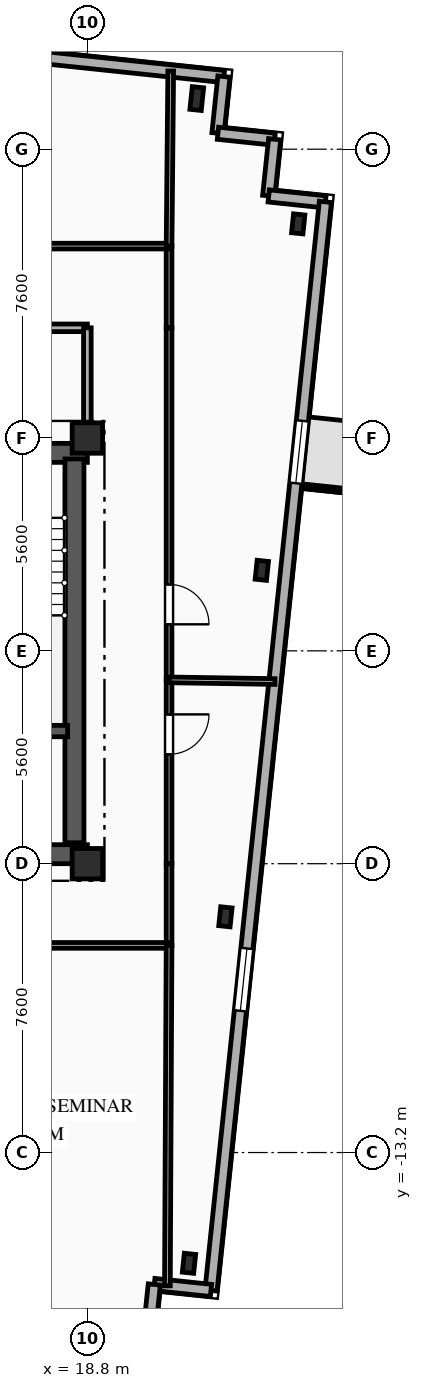
"""IFC4 building model, lengths in metres.
Left out: names, types, materials, properties, quantities, classifications, styles, units other than length and angle.
Written with IfcOpenShell. Run it as: python <this file> out.ifc"""

import sys

from ifc_helpers import new_model, si_unit, direction, frame, frame_2d, origin, origin_2d, place, context, subcontext, project, spatial, rectangle, i_section, extrude, element, fill, save


model = new_model("IFC4")
c1 = context("Model", 3, precision=1e-05, world=origin(), true_north=direction((0.0, 1.0)))
c2 = subcontext(c1, "Body", "Model", "MODEL_VIEW")
j1 = project(units=[si_unit("LENGTHUNIT", "METRE"), si_unit("PLANEANGLEUNIT", "RADIAN")], contexts=[c1])
p1 = place(None, origin())
s1 = spatial("IfcSite", under=j1, at=p1, CompositionType="ELEMENT")
p2 = place(p1, origin())
s2 = spatial("IfcBuilding", under=s1, at=p2, CompositionType="ELEMENT")
p3 = place(p2, frame((0.0, 0.0, 203.1)))
s3 = spatial("IfcBuildingStorey", under=s2, at=p3, CompositionType="ELEMENT", Elevation=203.1)
for number, where, z_axis, x_axis in (
    (1, (18.8, -5.6, 0.0), (0.0, 0.0, 1.0), (1.0, 0.0, 0.0)),
    (2, (18.8, 5.6, 0.0), (0.0, 0.0, 1.0), (1.0, 0.0, 0.0)),
):
    element("IfcColumn", number, at=place(p3, frame(where, z_axis=z_axis, x_axis=x_axis)), inside=s3, PredefinedType="COLUMN", context=c2, shape_type="SweptSolid", body=[
        extrude(rectangle(XDim=0.8, YDim=0.8, at=origin_2d()), origin(), (0.0, 0.0, 1.0), 3.35),
    ])
p4 = place(p3, frame((21.679, 14.532, 0.0), z_axis=(0.0, 0.0, 1.0), x_axis=(0.994521895368, -0.104528463268, 0.0)))
e3 = element("IfcColumn", 3, at=p4, inside=s3, PredefinedType="COLUMN", context=c2, shape_type="SweptSolid", body=[
    extrude(i_section(OverallWidth=0.3, OverallDepth=0.6, WebThickness=0.015, FlangeThickness=0.03, FilletRadius=0.027, at=origin_2d()), origin(), (0.0, 0.0, 1.0), 3.35),
])
for number, where, z_axis, x_axis in (
    (4, (21.474, -16.114, 0.0), (0.0, 0.0, 1.0), (0.995, -0.105, 0.0)),
    (5, (22.433, -6.998, 0.0), (0.0, 0.0, 1.0), (0.995, -0.105, 0.0)),
    (6, (23.391, 2.119, 0.0), (0.0, 0.0, 1.0), (0.995, -0.105, 0.0)),
    (7, (24.349, 11.235, 0.0), (0.0, 0.0, 1.0), (0.995, -0.105, 0.0)),
):
    element("IfcColumn", number, at=place(p3, frame(where, z_axis=z_axis, x_axis=x_axis)), inside=s3, PredefinedType="COLUMN", context=c2, shape_type="SweptSolid", body=[
        extrude(i_section(OverallWidth=0.3, OverallDepth=0.5, WebThickness=0.014, FlangeThickness=0.028, FilletRadius=0.027, at=origin_2d()), origin(), (0.0, 0.0, 1.0), 3.35),
    ])
p5 = place(p3, frame((-23.156, 19.898, 0.0), z_axis=(0.0, 0.0, 1.0), x_axis=(0.994522001802, -0.104527450613, 0.0)))
e8 = element("IfcWall", 8, at=p5, inside=s3, PredefinedType="SOLIDWALL", context=c2, shape_type="SweptSolid", body=[
    extrude(rectangle(XDim=45.8, YDim=0.32, at=frame_2d((22.9, 0.0))), origin(), (0.0, 0.0, 1.0), 3.04),
])
p6 = place(p5, frame((4.139, 0.0, 0.85)))
e9 = element("IfcOpeningElement", 9, at=p6, cuts=e8, PredefinedType="OPENING", context=c2, shape_type="SweptSolid", body=[
    extrude(rectangle(XDim=1.65, YDim=1.85, at=frame_2d((0.825, 0.925))), frame((0.0, 0.17, 0.0), z_axis=(0.0, -1.0, 0.0), x_axis=(1.0, 0.0, 0.0)), (0.0, 0.0, 1.0), 0.34),
])
p7 = place(p5, frame((9.384, 0.0, 0.85)))
e10 = element("IfcOpeningElement", 10, at=p7, cuts=e8, PredefinedType="OPENING", context=c2, shape_type="SweptSolid", body=[
    extrude(rectangle(XDim=1.65, YDim=1.85, at=frame_2d((0.825, 0.925))), frame((0.0, 0.17, 0.0), z_axis=(0.0, -1.0, 0.0), x_axis=(1.0, 0.0, 0.0)), (0.0, 0.0, 1.0), 0.34),
])
p8 = place(p5, frame((18.497, 0.0, 0.85)))
e11 = element("IfcOpeningElement", 11, at=p8, cuts=e8, PredefinedType="OPENING", context=c2, shape_type="SweptSolid", body=[
    extrude(rectangle(XDim=1.6, YDim=1.85, at=frame_2d((0.8, 0.925))), frame((0.0, 0.17, 0.0), z_axis=(0.0, -1.0, 0.0), x_axis=(1.0, 0.0, 0.0)), (0.0, 0.0, 1.0), 0.34),
])
p9 = place(p5, frame((27.525, 0.0, 0.85)))
e12 = element("IfcOpeningElement", 12, at=p9, cuts=e8, PredefinedType="OPENING", context=c2, shape_type="SweptSolid", body=[
    extrude(rectangle(XDim=2.2, YDim=1.85, at=frame_2d((1.1, 0.925))), frame((0.0, 0.17, 0.0), z_axis=(0.0, -1.0, 0.0), x_axis=(1.0, 0.0, 0.0)), (0.0, 0.0, 1.0), 0.34),
])
p10 = place(p5, frame((38.329, 0.0, 0.85)))
e13 = element("IfcOpeningElement", 13, at=p10, cuts=e8, PredefinedType="OPENING", context=c2, shape_type="SweptSolid", body=[
    extrude(rectangle(XDim=1.65, YDim=1.85, at=frame_2d((0.825, 0.925))), frame((0.0, 0.17, 0.0), z_axis=(0.0, -1.0, 0.0), x_axis=(1.0, 0.0, 0.0)), (0.0, 0.0, 1.0), 0.34),
])
p11 = place(p3, frame((22.393, 15.111, 0.0), z_axis=(0.0, 0.0, 1.0), x_axis=(-0.104481464157, -0.994526834051, 0.0)))
e14 = element("IfcWall", 14, at=p11, inside=s3, PredefinedType="SOLIDWALL", context=c2, shape_type="SweptSolid", body=[
    extrude(rectangle(XDim=1.5, YDim=0.32, at=frame_2d((0.75, 0.0))), origin(), (0.0, 0.0, 1.0), 3.04),
])
for number, where, z_axis, x_axis in (
    (15, (22.237, 13.619, 0.0), (0.0, 0.0, 1.0), (0.995, -0.104, 0.0)),
    (16, (23.728, 13.462, 0.0), (0.0, 0.0, 1.0), (-0.104, -0.995, 0.0)),
    (17, (23.572, 11.971, 0.0), (0.0, 0.0, 1.0), (0.995, -0.105, 0.0)),
):
    element("IfcWall", number, at=place(p3, frame(where, z_axis=z_axis, x_axis=x_axis)), inside=s3, PredefinedType="SOLIDWALL", context=c2, shape_type="SweptSolid", body=[
        extrude(rectangle(XDim=1.5, YDim=0.32, at=frame_2d((0.75, 0.0))), origin(), (0.0, 0.0, 1.0), 3.04),
    ])
p12 = place(p3, frame((25.063, 11.814, 0.0), z_axis=(0.0, 0.0, 1.0), x_axis=(-0.104523275986, -0.99452244056, 0.0)))
e18 = element("IfcWall", 18, at=p12, inside=s3, PredefinedType="SOLIDWALL", context=c2, shape_type="SweptSolid", body=[
    extrude(rectangle(XDim=28.8, YDim=0.32, at=frame_2d((14.4, 0.0))), origin(), (0.0, 0.0, 1.0), 3.04),
])
p13 = place(p12, frame((5.793, 0.0, 0.85)))
e19 = element("IfcOpeningElement", 19, at=p13, cuts=e18, PredefinedType="OPENING", context=c2, shape_type="SweptSolid", body=[
    extrude(rectangle(XDim=1.65, YDim=1.85, at=frame_2d((0.825, 0.925))), frame((0.0, 0.17, 0.0), z_axis=(0.0, -1.0, 0.0), x_axis=(1.0, 0.0, 0.0)), (0.0, 0.0, 1.0), 0.34),
])
p14 = place(p12, frame((19.752, 0.0, 0.85)))
e20 = element("IfcOpeningElement", 20, at=p14, cuts=e18, PredefinedType="OPENING", context=c2, shape_type="SweptSolid", body=[
    extrude(rectangle(XDim=1.65, YDim=1.85, at=frame_2d((0.825, 0.925))), frame((0.0, 0.17, 0.0), z_axis=(0.0, -1.0, 0.0), x_axis=(1.0, 0.0, 0.0)), (0.0, 0.0, 1.0), 0.34),
])
p15 = place(p3, frame((22.053, -16.828, 0.0), z_axis=(0.0, 0.0, 1.0), x_axis=(-0.994526834051, 0.104481464157, 0.0)))
e21 = element("IfcWall", 21, at=p15, inside=s3, PredefinedType="SOLIDWALL", context=c2, shape_type="SweptSolid", body=[
    extrude(rectangle(XDim=1.5, YDim=0.32, at=frame_2d((0.75, 0.0))), origin(), (0.0, 0.0, 1.0), 3.04),
])
p16 = place(p3, frame((20.561, -16.672, 0.0), z_axis=(0.0, 0.0, 1.0), x_axis=(-0.104498377516, -0.994525057048, 0.0)))
e22 = element("IfcWall", 22, at=p16, inside=s3, PredefinedType="SOLIDWALL", context=c2, shape_type="SweptSolid", body=[
    extrude(rectangle(XDim=1.5, YDim=0.32, at=frame_2d((0.75, 0.0))), origin(), (0.0, 0.0, 1.0), 3.04),
])
p17 = place(p3, frame((9.2, 5.21, 0.0), z_axis=(0.0, 0.0, 1.0), x_axis=(1.0, 0.0, 0.0)))
e23 = element("IfcWall", 23, at=p17, inside=s3, PredefinedType="SHEAR", context=c2, shape_type="SweptSolid", body=[
    extrude(rectangle(XDim=9.6, YDim=0.5, at=frame_2d((4.8, 0.0))), origin(), (0.0, 0.0, 1.0), 3.04),
])
p18 = place(p17, frame((6.95, 0.0, 0.0)))
e24 = element("IfcOpeningElement", 24, at=p18, cuts=e23, PredefinedType="OPENING", context=c2, shape_type="SweptSolid", body=[
    extrude(rectangle(XDim=1.1, YDim=2.15, at=frame_2d((0.55, 1.075))), frame((0.0, 0.26, 0.0), z_axis=(0.0, -1.0, 0.0), x_axis=(1.0, 0.0, 0.0)), (0.0, 0.0, 1.0), 0.52),
])
p19 = place(p17, frame((3.775, 0.0, 0.0)))
e25 = element("IfcOpeningElement", 25, at=p19, cuts=e23, PredefinedType="OPENING", context=c2, shape_type="SweptSolid", body=[
    extrude(rectangle(XDim=1.05, YDim=2.1, at=frame_2d((0.525, 1.05))), frame((0.0, 0.26, 0.0), z_axis=(0.0, -1.0, 0.0), x_axis=(1.0, 0.0, 0.0)), (0.0, 0.0, 1.0), 0.52),
])
p20 = place(p3, frame((9.2, -5.35, 0.0), z_axis=(0.0, 0.0, 1.0), x_axis=(1.0, 0.0, 0.0)))
e26 = element("IfcWall", 26, at=p20, inside=s3, PredefinedType="SHEAR", context=c2, shape_type="SweptSolid", body=[
    extrude(rectangle(XDim=9.6, YDim=0.5, at=frame_2d((4.8, 0.0))), origin(), (0.0, 0.0, 1.0), 3.04),
])
p21 = place(p20, frame((7.65, 0.0, 0.0)))
e27 = element("IfcOpeningElement", 27, at=p21, cuts=e26, PredefinedType="OPENING", context=c2, shape_type="SweptSolid", body=[
    extrude(rectangle(XDim=0.9, YDim=2.1, at=frame_2d((0.45, 1.05))), frame((0.0, 0.26, 0.0), z_axis=(0.0, -1.0, 0.0), x_axis=(1.0, 0.0, 0.0)), (0.0, 0.0, 1.0), 0.52),
])
p22 = place(p3, frame((18.46, -5.05, 0.0), z_axis=(0.0, 0.0, 1.0), x_axis=(0.0, 1.0, 0.0)))
e28 = element("IfcWall", 28, at=p22, inside=s3, PredefinedType="SHEAR", context=c2, shape_type="SweptSolid", body=[
    extrude(rectangle(XDim=10.1, YDim=0.5, at=frame_2d((5.05, 0.0))), origin(), (0.0, 0.0, 1.0), 3.04),
])
p23 = place(p3, frame((15.1, -2.11, 0.0), z_axis=(0.0, 0.0, 1.0), x_axis=(1.0, 0.0, 0.0)))
e29 = element("IfcWall", 29, at=p23, inside=s3, PredefinedType="SHEAR", context=c2, shape_type="SweptSolid", body=[
    extrude(rectangle(XDim=3.18, YDim=0.3, at=frame_2d((1.59, 0.0))), origin(), (0.0, 0.0, 1.0), 3.04),
])
p24 = place(p3, frame((18.8, 8.5, 0.0), z_axis=(0.0, 0.0, 1.0), x_axis=(-1.0, 0.0, 0.0)))
e30 = element("IfcWall", 30, at=p24, inside=s3, PredefinedType="PARTITIONING", context=c2, shape_type="SweptSolid", body=[
    extrude(rectangle(XDim=6.8, YDim=0.2, at=frame_2d((3.4, 0.0))), origin(), (0.0, 0.0, 1.0), 3.04),
])
p25 = place(p24, frame((3.985, 0.0, 0.0)))
e31 = element("IfcOpeningElement", 31, at=p25, cuts=e30, PredefinedType="OPENING", context=c2, shape_type="SweptSolid", body=[
    extrude(rectangle(XDim=1.1, YDim=2.15, at=frame_2d((0.55, 1.075))), frame((0.0, 0.11, 0.0), z_axis=(0.0, -1.0, 0.0), x_axis=(1.0, 0.0, 0.0)), (0.0, 0.0, 1.0), 0.22),
])
p26 = place(p3, frame((18.8, 5.6, 0.0), z_axis=(0.0, 0.0, 1.0), x_axis=(0.0, 1.0, 0.0)))
e32 = element("IfcWall", 32, at=p26, inside=s3, PredefinedType="PARTITIONING", context=c2, shape_type="SweptSolid", body=[
    extrude(rectangle(XDim=2.9, YDim=0.2, at=frame_2d((1.45, 0.0))), origin(), (0.0, 0.0, 1.0), 2.665),
])
p27 = place(p3, frame((20.95, 10.65, 0.0), z_axis=(0.0, 0.0, 1.0), x_axis=(0.0, -1.0, 0.0)))
e33 = element("IfcWall", 33, at=p27, inside=s3, PredefinedType="PARTITIONING", context=c2, shape_type="SweptSolid", body=[
    extrude(rectangle(XDim=2.15, YDim=0.15, at=frame_2d((1.075, 0.0))), origin(), (0.0, 0.0, 1.0), 3.04),
])
p28 = place(p3, frame((10.475, 10.65, 0.0), z_axis=(0.0, 0.0, 1.0), x_axis=(1.0, 0.0, 0.0)))
e34 = element("IfcWall", 34, at=p28, inside=s3, PredefinedType="PARTITIONING", context=c2, shape_type="SweptSolid", body=[
    extrude(rectangle(XDim=10.475, YDim=0.15, at=frame_2d((5.237, 0.0))), origin(), (0.0, 0.0, 1.0), 3.04),
])
p29 = place(p28, frame((5.746, 0.0, 0.0)))
e35 = element("IfcOpeningElement", 35, at=p29, cuts=e34, PredefinedType="OPENING", context=c2, shape_type="SweptSolid", body=[
    extrude(rectangle(XDim=1.05, YDim=2.15, at=frame_2d((0.525, 1.075))), frame((0.0, 0.085, 0.0), z_axis=(0.0, -1.0, 0.0), x_axis=(1.0, 0.0, 0.0)), (0.0, 0.0, 1.0), 0.17),
])
p30 = place(p3, frame((20.95, -5.6, 0.0), z_axis=(0.0, 0.0, 1.0), x_axis=(0.0, -1.0, 0.0)))
e36 = element("IfcWall", 36, at=p30, inside=s3, PredefinedType="PARTITIONING", context=c2, shape_type="SweptSolid", body=[
    extrude(rectangle(XDim=2.15, YDim=0.15, at=frame_2d((1.075, 0.0))), origin(), (0.0, 0.0, 1.0), 3.04),
])
p31 = place(p3, frame((20.95, -7.75, 0.0), z_axis=(0.0, 0.0, 1.0), x_axis=(-1.0, 0.0, 0.0)))
e37 = element("IfcWall", 37, at=p31, inside=s3, PredefinedType="PARTITIONING", context=c2, shape_type="SweptSolid", body=[
    extrude(rectangle(XDim=6.983, YDim=0.15, at=frame_2d((3.492, 0.0))), origin(), (0.0, 0.0, 1.0), 3.04),
])
p32 = place(p31, frame((4.757, 0.0, 0.0)))
e38 = element("IfcOpeningElement", 38, at=p32, cuts=e37, PredefinedType="OPENING", context=c2, shape_type="SweptSolid", body=[
    extrude(rectangle(XDim=1.05, YDim=2.15, at=frame_2d((0.525, 1.075))), frame((0.0, 0.085, 0.0), z_axis=(0.0, -1.0, 0.0), x_axis=(1.0, 0.0, 0.0)), (0.0, 0.0, 1.0), 0.17),
])
p33 = place(p3, frame((20.95, -0.763, 0.0), z_axis=(0.0, 0.0, 1.0), x_axis=(0.0, -1.0, 0.0)))
e39 = element("IfcWall", 39, at=p33, inside=s3, PredefinedType="PARTITIONING", context=c2, shape_type="SweptSolid", body=[
    extrude(rectangle(XDim=4.837, YDim=0.15, at=frame_2d((2.418, 0.0))), origin(), (0.0, 0.0, 1.0), 2.695),
])
p34 = place(p33, frame((0.908, 0.0, 0.0)))
e40 = element("IfcOpeningElement", 40, at=p34, cuts=e39, PredefinedType="OPENING", context=c2, shape_type="SweptSolid", body=[
    extrude(rectangle(XDim=1.05, YDim=2.15, at=frame_2d((0.525, 1.075))), frame((0.0, 0.085, 0.0), z_axis=(0.0, -1.0, 0.0), x_axis=(1.0, 0.0, 0.0)), (0.0, 0.0, 1.0), 0.17),
])
p35 = place(p3, frame((20.95, 8.5, 0.0), z_axis=(0.0, 0.0, 1.0), x_axis=(0.0, -1.0, 0.0)))
e41 = element("IfcWall", 41, at=p35, inside=s3, PredefinedType="PARTITIONING", context=c2, shape_type="SweptSolid", body=[
    extrude(rectangle(XDim=9.263, YDim=0.15, at=frame_2d((4.632, 0.0))), origin(), (0.0, 0.0, 1.0), 2.695),
])
p36 = place(p35, frame((6.751, 0.0, 0.0)))
e42 = element("IfcOpeningElement", 42, at=p36, cuts=e41, PredefinedType="OPENING", context=c2, shape_type="SweptSolid", body=[
    extrude(rectangle(XDim=1.05, YDim=2.15, at=frame_2d((0.525, 1.075))), frame((0.0, 0.085, 0.0), z_axis=(0.0, -1.0, 0.0), x_axis=(1.0, 0.0, 0.0)), (0.0, 0.0, 1.0), 0.17),
])
p37 = place(p3, frame((20.95, -0.763, 0.0), z_axis=(0.0, 0.0, 1.0), x_axis=(0.999875696831, -0.015766765259, 0.0)))
e43 = element("IfcWall", 43, at=p37, inside=s3, PredefinedType="PARTITIONING", context=c2, shape_type="SweptSolid", body=[
    extrude(rectangle(XDim=2.787, YDim=0.15, at=frame_2d((1.394, 0.0))), origin(), (0.0, 0.0, 1.0), 3.04),
])
p38 = place(p3, frame((20.906, -16.708, 0.0), z_axis=(0.0, 0.0, 1.0), x_axis=(0.004905642486, 0.999987967264, 0.0)))
e44 = element("IfcWall", 44, at=p38, inside=s3, PredefinedType="PARTITIONING", context=c2, shape_type="SweptSolid", body=[
    extrude(rectangle(XDim=8.958, YDim=0.15, at=frame_2d((4.479, 0.0))), origin(), (0.0, 0.0, 1.0), 2.665),
])
p39 = place(p3, frame((20.95, 10.65, 0.0), z_axis=(0.0, 0.0, 1.0), x_axis=(0.009535990233, 0.999954531411, 0.0)))
e45 = element("IfcWall", 45, at=p39, inside=s3, PredefinedType="PARTITIONING", context=c2, shape_type="SweptSolid", body=[
    extrude(rectangle(XDim=4.608, YDim=0.15, at=frame_2d((2.304, 0.0))), origin(), (0.0, 0.0, 1.0), 2.665),
])
p40 = place(p13, origin())
e46 = element("IfcWindow", 46, at=p40, inside=s3, PartitioningType="SINGLE_PANEL", PredefinedType="WINDOW", context=c2, shape_type="SweptSolid", body=[
    extrude(rectangle(XDim=1.65, YDim=1.85, at=frame_2d((0.825, 0.925))), frame((0.0, 0.03, 0.0), z_axis=(0.0, -1.0, 0.0), x_axis=(1.0, 0.0, 0.0)), (0.0, 0.0, 1.0), 0.06),
])
fill(e19, e46)
p41 = place(p14, origin())
e47 = element("IfcWindow", 47, at=p41, inside=s3, PartitioningType="SINGLE_PANEL", PredefinedType="WINDOW", context=c2, shape_type="SweptSolid", body=[
    extrude(rectangle(XDim=1.65, YDim=1.85, at=frame_2d((0.825, 0.925))), frame((0.0, 0.03, 0.0), z_axis=(0.0, -1.0, 0.0), x_axis=(1.0, 0.0, 0.0)), (0.0, 0.0, 1.0), 0.06),
])
fill(e20, e47)
p42 = place(p34, origin())
e48 = element("IfcDoor", 48, at=p42, inside=s3, OperationType="SINGLE_SWING_LEFT", PredefinedType="DOOR", context=c2, shape_type="SweptSolid", body=[
    extrude(rectangle(XDim=1.05, YDim=2.15, at=frame_2d((0.525, 1.075))), frame((0.0, 0.025, 0.0), z_axis=(0.0, -1.0, 0.0), x_axis=(1.0, 0.0, 0.0)), (0.0, 0.0, 1.0), 0.05),
])
fill(e40, e48)
p43 = place(p36, origin())
e49 = element("IfcDoor", 49, at=p43, inside=s3, OperationType="SINGLE_SWING_RIGHT", PredefinedType="DOOR", context=c2, shape_type="SweptSolid", body=[
    extrude(rectangle(XDim=1.05, YDim=2.15, at=frame_2d((0.525, 1.075))), frame((0.0, 0.025, 0.0), z_axis=(0.0, -1.0, 0.0), x_axis=(1.0, 0.0, 0.0)), (0.0, 0.0, 1.0), 0.05),
])
fill(e42, e49)
save(model, sys.argv[1])
